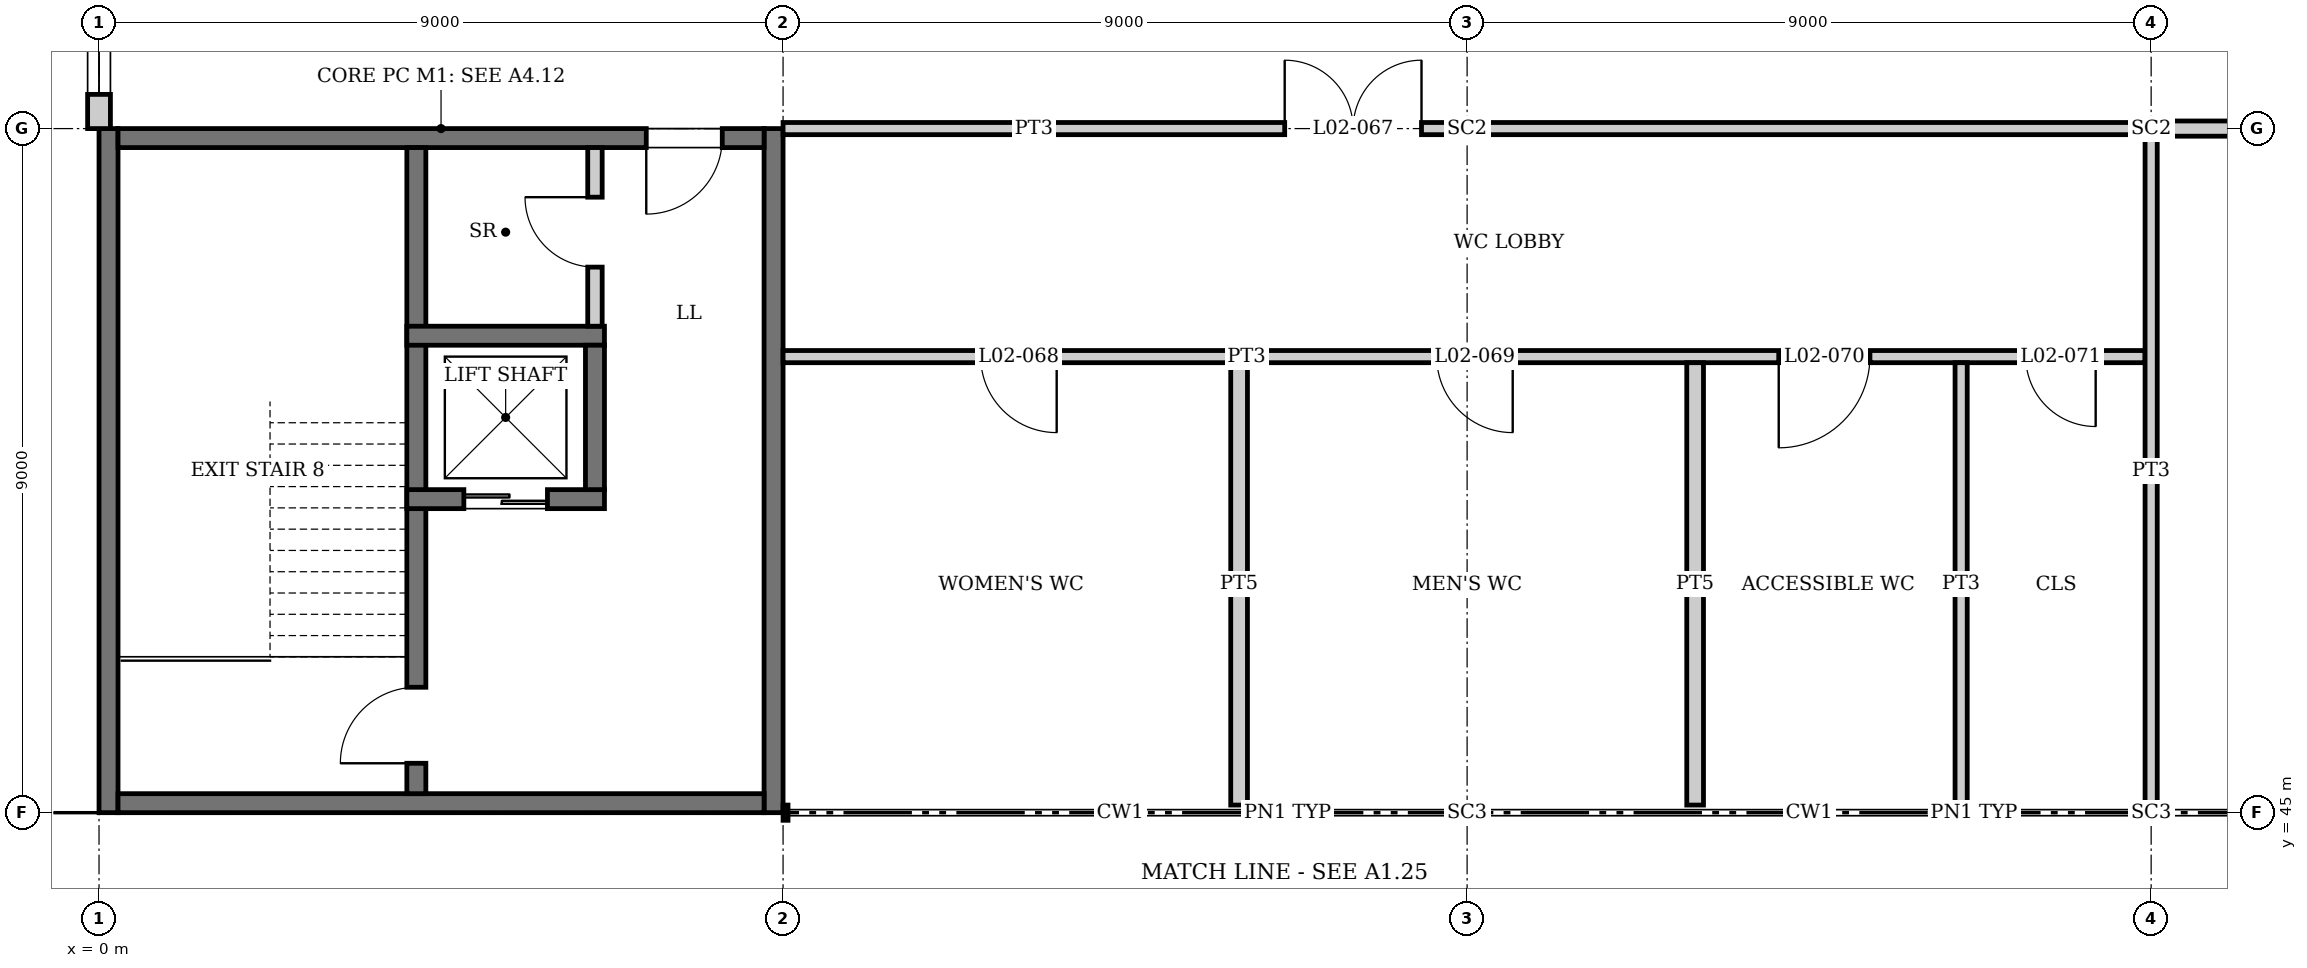
"""IFC4 building model, lengths in metres.
Left out: names, types, materials, properties, quantities, classifications, styles, units other than length and angle.
Written with IfcOpenShell. Run it as: python <this file> out.ifc"""

import sys

from ifc_helpers import new_model, si_unit, direction, frame, frame_2d, origin, origin_2d, place, context, subcontext, project, spatial, rectangle, i_section, extrude, element, fill, save


model = new_model("IFC4")
c1 = context("Model", 3, precision=1e-05, world=origin(), true_north=direction((0.0, 1.0)))
c2 = subcontext(c1, "Body", "Model", "MODEL_VIEW")
j1 = project(units=[si_unit("LENGTHUNIT", "METRE"), si_unit("PLANEANGLEUNIT", "RADIAN")], contexts=[c1])
p1 = place(None, origin())
s1 = spatial("IfcSite", under=j1, at=p1, CompositionType="ELEMENT")
p2 = place(p1, origin())
s2 = spatial("IfcBuilding", under=s1, at=p2, CompositionType="ELEMENT")
p3 = place(p2, frame((0.0, 0.0, 10.5)))
s3 = spatial("IfcBuildingStorey", under=s2, at=p3, CompositionType="ELEMENT", Elevation=10.5)
p4 = place(p3, frame((18.0, 45.0, 0.0), z_axis=(0.0, 0.0, 1.0), x_axis=(0.0, 1.0, 0.0)))
e1 = element("IfcColumn", 1, at=p4, inside=s3, PredefinedType="COLUMN", context=c2, shape_type="SweptSolid", body=[
    extrude(i_section(OverallWidth=0.254, OverallDepth=0.254, WebThickness=0.009, FlangeThickness=0.014, at=origin_2d()), origin(), (0.0, 0.0, 1.0), 4.5),
])
p5 = place(p3, frame((18.0, 54.0, 0.0), z_axis=(0.0, 0.0, 1.0), x_axis=(0.0, 1.0, 0.0)))
e2 = element("IfcColumn", 2, at=p5, inside=s3, PredefinedType="COLUMN", context=c2, shape_type="SweptSolid", body=[
    extrude(i_section(OverallWidth=0.256, OverallDepth=0.26, WebThickness=0.01, FlangeThickness=0.017, at=origin_2d()), origin(), (0.0, 0.0, 1.0), 4.5),
])
p6 = place(p3, frame((27.0, 45.0, 0.0), z_axis=(0.0, 0.0, 1.0), x_axis=(0.0, 1.0, 0.0)))
e3 = element("IfcColumn", 3, at=p6, inside=s3, PredefinedType="COLUMN", context=c2, shape_type="SweptSolid", body=[
    extrude(i_section(OverallWidth=0.254, OverallDepth=0.254, WebThickness=0.009, FlangeThickness=0.014, at=origin_2d()), origin(), (0.0, 0.0, 1.0), 4.5),
])
p7 = place(p3, frame((27.0, 54.0, 0.0), z_axis=(0.0, 0.0, 1.0), x_axis=(0.0, 1.0, 0.0)))
e4 = element("IfcColumn", 4, at=p7, inside=s3, PredefinedType="COLUMN", context=c2, shape_type="SweptSolid", body=[
    extrude(i_section(OverallWidth=0.256, OverallDepth=0.26, WebThickness=0.01, FlangeThickness=0.017, at=origin_2d()), origin(), (0.0, 0.0, 1.0), 4.5),
])
for number, where, z_axis, x_axis in (
    (5, (0.125, 45.0, 0.0), (0.0, 0.0, 1.0), (0.0, 1.0, 0.0)),
    (6, (8.875, 45.0, 0.0), (0.0, 0.0, 1.0), (0.0, 1.0, 0.0)),
):
    element("IfcWall", number, at=place(p3, frame(where, z_axis=z_axis, x_axis=x_axis)), inside=s3, PredefinedType="SHEAR", context=c2, shape_type="SweptSolid", body=[
        extrude(rectangle(XDim=9.0, YDim=0.25, at=frame_2d((4.5, 0.0))), origin(), (0.0, 0.0, 1.0), 4.35),
    ])
p8 = place(p3, frame((0.25, 45.125, 0.0), z_axis=(0.0, 0.0, 1.0), x_axis=(1.0, 0.0, 0.0)))
e7 = element("IfcWall", 7, at=p8, inside=s3, PredefinedType="SHEAR", context=c2, shape_type="SweptSolid", body=[
    extrude(rectangle(XDim=8.5, YDim=0.25, at=frame_2d((4.25, 0.0))), origin(), (0.0, 0.0, 1.0), 4.35),
])
p9 = place(p3, frame((0.25, 53.875, 0.0), z_axis=(0.0, 0.0, 1.0), x_axis=(1.0, 0.0, 0.0)))
e8 = element("IfcWall", 8, at=p9, inside=s3, PredefinedType="SHEAR", context=c2, shape_type="SweptSolid", body=[
    extrude(rectangle(XDim=8.5, YDim=0.25, at=frame_2d((4.25, 0.0))), origin(), (0.0, 0.0, 1.0), 4.35),
])
p10 = place(p9, frame((6.95, 0.0, 0.0)))
e9 = element("IfcOpeningElement", 9, at=p10, cuts=e8, PredefinedType="OPENING", context=c2, shape_type="SweptSolid", body=[
    extrude(rectangle(XDim=1.0, YDim=2.1, at=frame_2d((0.5, 1.05))), frame((0.0, 0.135, 0.0), z_axis=(0.0, -1.0, 0.0), x_axis=(1.0, 0.0, 0.0)), (0.0, 0.0, 1.0), 0.27),
])
p11 = place(p3, frame((0.0, 54.0, 0.0), z_axis=(0.0, 0.0, 1.0), x_axis=(0.0, 1.0, 0.0)))
e10 = element("IfcWall", 10, at=p11, inside=s3, PredefinedType="SOLIDWALL", context=c2, shape_type="SweptSolid", body=[
    extrude(rectangle(XDim=8.873, YDim=0.3, at=frame_2d((4.437, 0.0))), origin(), (0.0, 0.0, 1.0), 3.991),
])
p12 = place(p11, frame((0.45, 0.0, 2.4)))
e11 = element("IfcOpeningElement", 11, at=p12, cuts=e10, PredefinedType="OPENING", context=c2, shape_type="SweptSolid", body=[
    extrude(rectangle(XDim=3.6, YDim=1.0, at=frame_2d((1.8, 0.5))), frame((0.0, 0.16, 0.0), z_axis=(0.0, -1.0, 0.0), x_axis=(1.0, 0.0, 0.0)), (0.0, 0.0, 1.0), 0.32),
])
p13 = place(p11, frame((4.95, 0.0, 2.4)))
e12 = element("IfcOpeningElement", 12, at=p13, cuts=e10, PredefinedType="OPENING", context=c2, shape_type="SweptSolid", body=[
    extrude(rectangle(XDim=3.6, YDim=1.0, at=frame_2d((1.8, 0.5))), frame((0.0, 0.16, 0.0), z_axis=(0.0, -1.0, 0.0), x_axis=(1.0, 0.0, 0.0)), (0.0, 0.0, 1.0), 0.32),
])
p14 = place(p3, frame((4.175, 45.25, 0.0), z_axis=(0.0, 0.0, 1.0), x_axis=(0.0, 1.0, 0.0)))
e13 = element("IfcWall", 13, at=p14, inside=s3, PredefinedType="SOLIDWALL", context=c2, shape_type="SweptSolid", body=[
    extrude(rectangle(XDim=8.5, YDim=0.25, at=frame_2d((4.25, 0.0))), origin(), (0.0, 0.0, 1.0), 4.35),
])
p15 = place(p14, frame((0.4, 0.0, 0.0)))
e14 = element("IfcOpeningElement", 14, at=p15, cuts=e13, PredefinedType="OPENING", context=c2, shape_type="SweptSolid", body=[
    extrude(rectangle(XDim=1.0, YDim=2.1, at=frame_2d((0.5, 1.05))), frame((0.0, 0.135, 0.0), z_axis=(0.0, -1.0, 0.0), x_axis=(1.0, 0.0, 0.0)), (0.0, 0.0, 1.0), 0.27),
])
p16 = place(p3, frame((4.05, 49.125, 0.0), z_axis=(0.0, 0.0, 1.0), x_axis=(1.0, 0.0, 0.0)))
e15 = element("IfcWall", 15, at=p16, inside=s3, PredefinedType="SOLIDWALL", context=c2, shape_type="SweptSolid", body=[
    extrude(rectangle(XDim=2.6, YDim=0.25, at=frame_2d((1.3, 0.0))), origin(), (0.0, 0.0, 1.0), 4.35),
])
p17 = place(p16, frame((0.75, 0.0, 0.0)))
e16 = element("IfcOpeningElement", 16, at=p17, cuts=e15, PredefinedType="OPENING", context=c2, shape_type="SweptSolid", body=[
    extrude(rectangle(XDim=1.1, YDim=2.1, at=frame_2d((0.55, 1.05))), frame((0.0, 0.135, 0.0), z_axis=(0.0, -1.0, 0.0), x_axis=(1.0, 0.0, 0.0)), (0.0, 0.0, 1.0), 0.27),
])
p18 = place(p3, frame((4.05, 51.275, 0.0), z_axis=(0.0, 0.0, 1.0), x_axis=(1.0, 0.0, 0.0)))
e17 = element("IfcWall", 17, at=p18, inside=s3, PredefinedType="SOLIDWALL", context=c2, shape_type="SweptSolid", body=[
    extrude(rectangle(XDim=2.6, YDim=0.25, at=frame_2d((1.3, 0.0))), origin(), (0.0, 0.0, 1.0), 4.35),
])
p19 = place(p3, frame((6.525, 49.25, 0.0), z_axis=(0.0, 0.0, 1.0), x_axis=(0.0, 1.0, 0.0)))
e18 = element("IfcWall", 18, at=p19, inside=s3, PredefinedType="SOLIDWALL", context=c2, shape_type="SweptSolid", body=[
    extrude(rectangle(XDim=1.9, YDim=0.25, at=frame_2d((0.95, 0.0))), origin(), (0.0, 0.0, 1.0), 4.35),
])
p20 = place(p3, frame((9.0, 51.0, 0.0), z_axis=(0.0, 0.0, 1.0), x_axis=(1.0, 0.0, 0.0)))
e19 = element("IfcWall", 19, at=p20, inside=s3, PredefinedType="PARTITIONING", context=c2, shape_type="SweptSolid", body=[
    extrude(rectangle(XDim=17.92, YDim=0.16, at=frame_2d((8.96, 0.0))), origin(), (0.0, 0.0, 1.0), 3.998),
])
p21 = place(p20, frame((2.6, 0.0, 0.0)))
e20 = element("IfcOpeningElement", 20, at=p21, cuts=e19, PredefinedType="OPENING", context=c2, shape_type="SweptSolid", body=[
    extrude(rectangle(XDim=1.0, YDim=2.1, at=frame_2d((0.5, 1.05))), frame((0.0, 0.09, 0.0), z_axis=(0.0, -1.0, 0.0), x_axis=(1.0, 0.0, 0.0)), (0.0, 0.0, 1.0), 0.18),
])
p22 = place(p20, frame((8.6, 0.0, 0.0)))
e21 = element("IfcOpeningElement", 21, at=p22, cuts=e19, PredefinedType="OPENING", context=c2, shape_type="SweptSolid", body=[
    extrude(rectangle(XDim=1.0, YDim=2.1, at=frame_2d((0.5, 1.05))), frame((0.0, 0.09, 0.0), z_axis=(0.0, -1.0, 0.0), x_axis=(1.0, 0.0, 0.0)), (0.0, 0.0, 1.0), 0.18),
])
p23 = place(p20, frame((13.1, 0.0, 0.0)))
e22 = element("IfcOpeningElement", 22, at=p23, cuts=e19, PredefinedType="OPENING", context=c2, shape_type="SweptSolid", body=[
    extrude(rectangle(XDim=1.2, YDim=2.1, at=frame_2d((0.6, 1.05))), frame((0.0, 0.09, 0.0), z_axis=(0.0, -1.0, 0.0), x_axis=(1.0, 0.0, 0.0)), (0.0, 0.0, 1.0), 0.18),
])
p24 = place(p20, frame((16.35, 0.0, 0.0)))
e23 = element("IfcOpeningElement", 23, at=p24, cuts=e19, PredefinedType="OPENING", context=c2, shape_type="SweptSolid", body=[
    extrude(rectangle(XDim=0.92, YDim=2.1, at=frame_2d((0.46, 1.05))), frame((0.0, 0.09, 0.0), z_axis=(0.0, -1.0, 0.0), x_axis=(1.0, 0.0, 0.0)), (0.0, 0.0, 1.0), 0.18),
])
p25 = place(p3, frame((9.0, 54.0, 0.0), z_axis=(0.0, 0.0, 1.0), x_axis=(1.0, 0.0, 0.0)))
e24 = element("IfcWall", 24, at=p25, inside=s3, PredefinedType="PARTITIONING", context=c2, shape_type="SweptSolid", body=[
    extrude(rectangle(XDim=8.87, YDim=0.16, at=frame_2d((4.435, 0.0))), origin(), (0.0, 0.0, 1.0), 3.738),
])
p26 = place(p25, frame((6.6, 0.0, 0.0)))
e25 = element("IfcOpeningElement", 25, at=p26, cuts=e24, PredefinedType="OPENING", context=c2, shape_type="SweptSolid", body=[
    extrude(rectangle(XDim=1.8, YDim=2.1, at=frame_2d((0.9, 1.05))), frame((0.0, 0.09, 0.0), z_axis=(0.0, -1.0, 0.0), x_axis=(1.0, 0.0, 0.0)), (0.0, 0.0, 1.0), 0.18),
])
p27 = place(p3, frame((18.13, 54.0, 0.0), z_axis=(0.0, 0.0, 1.0), x_axis=(1.0, 0.0, 0.0)))
e26 = element("IfcWall", 26, at=p27, inside=s3, PredefinedType="PARTITIONING", context=c2, shape_type="SweptSolid", body=[
    extrude(rectangle(XDim=8.74, YDim=0.16, at=frame_2d((4.37, 0.0))), origin(), (0.0, 0.0, 1.0), 3.738),
])
p28 = place(p3, frame((27.13, 54.0, 0.0), z_axis=(0.0, 0.0, 1.0), x_axis=(1.0, 0.0, 0.0)))
e27 = element("IfcWall", 27, at=p28, inside=s3, PredefinedType="PARTITIONING", context=c2, shape_type="SweptSolid", body=[
    extrude(rectangle(XDim=8.74, YDim=0.2, at=frame_2d((4.37, 0.0))), origin(), (0.0, 0.0, 1.0), 3.738),
])
p29 = place(p28, frame((3.97, 0.0, 0.0)))
e28 = element("IfcOpeningElement", 28, at=p29, cuts=e27, PredefinedType="OPENING", context=c2, shape_type="SweptSolid", body=[
    extrude(rectangle(XDim=1.0, YDim=2.1, at=frame_2d((0.5, 1.05))), frame((0.0, 0.11, 0.0), z_axis=(0.0, -1.0, 0.0), x_axis=(1.0, 0.0, 0.0)), (0.0, 0.0, 1.0), 0.22),
])
p30 = place(p3, frame((6.525, 51.4, 0.0), z_axis=(0.0, 0.0, 1.0), x_axis=(0.0, 1.0, 0.0)))
e29 = element("IfcWall", 29, at=p30, inside=s3, PredefinedType="PARTITIONING", context=c2, shape_type="SweptSolid", body=[
    extrude(rectangle(XDim=2.35, YDim=0.19, at=frame_2d((1.175, 0.0))), origin(), (0.0, 0.0, 1.0), 4.35),
])
p31 = place(p30, frame((0.778, 0.0, 0.0)))
e30 = element("IfcOpeningElement", 30, at=p31, cuts=e29, PredefinedType="OPENING", context=c2, shape_type="SweptSolid", body=[
    extrude(rectangle(XDim=0.92, YDim=2.1, at=frame_2d((0.46, 1.05))), frame((0.0, 0.105, 0.0), z_axis=(0.0, -1.0, 0.0), x_axis=(1.0, 0.0, 0.0)), (0.0, 0.0, 1.0), 0.21),
])
for number, where, z_axis, x_axis in (
    (31, (15.0, 45.1, 0.0), (0.0, 0.0, 1.0), (0.0, 1.0, 0.0)),
    (32, (21.0, 45.1, 0.0), (0.0, 0.0, 1.0), (0.0, 1.0, 0.0)),
):
    element("IfcWall", number, at=place(p3, frame(where, z_axis=z_axis, x_axis=x_axis)), inside=s3, PredefinedType="PLUMBINGWALL", context=c2, shape_type="SweptSolid", body=[
        extrude(rectangle(XDim=5.82, YDim=0.22, at=frame_2d((2.91, 0.0))), origin(), (0.0, 0.0, 1.0), 4.35),
    ])
p32 = place(p3, frame((24.5, 45.1, 0.0), z_axis=(0.0, 0.0, 1.0), x_axis=(0.0, 1.0, 0.0)))
e33 = element("IfcWall", 33, at=p32, inside=s3, PredefinedType="PARTITIONING", context=c2, shape_type="SweptSolid", body=[
    extrude(rectangle(XDim=5.82, YDim=0.16, at=frame_2d((2.91, 0.0))), origin(), (0.0, 0.0, 1.0), 4.35),
])
p33 = place(p3, frame((27.0, 45.127, 0.0), z_axis=(0.0, 0.0, 1.0), x_axis=(0.0, 1.0, 0.0)))
e34 = element("IfcWall", 34, at=p33, inside=s3, PredefinedType="PARTITIONING", context=c2, shape_type="SweptSolid", body=[
    extrude(rectangle(XDim=8.743, YDim=0.16, at=frame_2d((4.372, 0.0))), origin(), (0.0, 0.0, 1.0), 3.998),
])
p34 = place(p12, origin())
e35 = element("IfcWindow", 35, at=p34, inside=s3, PartitioningType="SINGLE_PANEL", PredefinedType="WINDOW", context=c2, shape_type="SweptSolid", body=[
    extrude(rectangle(XDim=3.6, YDim=1.0, at=frame_2d((1.8, 0.5))), frame((0.0, 0.03, 0.0), z_axis=(0.0, -1.0, 0.0), x_axis=(1.0, 0.0, 0.0)), (0.0, 0.0, 1.0), 0.06),
])
fill(e11, e35)
p35 = place(p17, origin())
e36 = element("IfcDoor", 36, at=p35, inside=s3, OperationType="DOUBLE_DOOR_SLIDING", PredefinedType="DOOR", context=c2, shape_type="SweptSolid", body=[
    extrude(rectangle(XDim=1.1, YDim=2.1, at=frame_2d((0.55, 1.05))), frame((0.0, 0.025, 0.0), z_axis=(0.0, -1.0, 0.0), x_axis=(1.0, 0.0, 0.0)), (0.0, 0.0, 1.0), 0.05),
])
fill(e16, e36)
p36 = place(p15, origin())
e37 = element("IfcDoor", 37, at=p36, inside=s3, OperationType="SINGLE_SWING_LEFT", PredefinedType="DOOR", context=c2, shape_type="SweptSolid", body=[
    extrude(rectangle(XDim=1.0, YDim=2.1, at=frame_2d((0.5, 1.05))), frame((0.0, 0.025, 0.0), z_axis=(0.0, -1.0, 0.0), x_axis=(1.0, 0.0, 0.0)), (0.0, 0.0, 1.0), 0.05),
])
fill(e14, e37)
p37 = place(p10, frame((1.0, 0.0, 0.0), z_axis=(0.0, 0.0, 1.0), x_axis=(-1.0, 0.0, 0.0)))
e38 = element("IfcDoor", 38, at=p37, inside=s3, OperationType="SINGLE_SWING_RIGHT", PredefinedType="DOOR", context=c2, shape_type="SweptSolid", body=[
    extrude(rectangle(XDim=1.0, YDim=2.1, at=frame_2d((0.5, 1.05))), frame((0.0, 0.025, 0.0), z_axis=(0.0, -1.0, 0.0), x_axis=(1.0, 0.0, 0.0)), (0.0, 0.0, 1.0), 0.05),
])
fill(e9, e38)
p38 = place(p31, origin())
e39 = element("IfcDoor", 39, at=p38, inside=s3, OperationType="SINGLE_SWING_RIGHT", PredefinedType="DOOR", context=c2, shape_type="SweptSolid", body=[
    extrude(rectangle(XDim=0.92, YDim=2.1, at=frame_2d((0.46, 1.05))), frame((0.0, 0.025, 0.0), z_axis=(0.0, -1.0, 0.0), x_axis=(1.0, 0.0, 0.0)), (0.0, 0.0, 1.0), 0.05),
])
fill(e30, e39)
p39 = place(p26, origin())
e40 = element("IfcDoor", 40, at=p39, inside=s3, OperationType="DOUBLE_DOOR_SINGLE_SWING", PredefinedType="DOOR", context=c2, shape_type="SweptSolid", body=[
    extrude(rectangle(XDim=1.8, YDim=2.1, at=frame_2d((0.9, 1.05))), frame((0.0, 0.025, 0.0), z_axis=(0.0, -1.0, 0.0), x_axis=(1.0, 0.0, 0.0)), (0.0, 0.0, 1.0), 0.05),
])
fill(e25, e40)
p40 = place(p21, frame((1.0, 0.0, 0.0), z_axis=(0.0, 0.0, 1.0), x_axis=(-1.0, 0.0, 0.0)))
e41 = element("IfcDoor", 41, at=p40, inside=s3, OperationType="SINGLE_SWING_LEFT", PredefinedType="DOOR", context=c2, shape_type="SweptSolid", body=[
    extrude(rectangle(XDim=1.0, YDim=2.1, at=frame_2d((0.5, 1.05))), frame((0.0, 0.025, 0.0), z_axis=(0.0, -1.0, 0.0), x_axis=(1.0, 0.0, 0.0)), (0.0, 0.0, 1.0), 0.05),
])
fill(e20, e41)
p41 = place(p22, frame((1.0, 0.0, 0.0), z_axis=(0.0, 0.0, 1.0), x_axis=(-1.0, 0.0, 0.0)))
e42 = element("IfcDoor", 42, at=p41, inside=s3, OperationType="SINGLE_SWING_LEFT", PredefinedType="DOOR", context=c2, shape_type="SweptSolid", body=[
    extrude(rectangle(XDim=1.0, YDim=2.1, at=frame_2d((0.5, 1.05))), frame((0.0, 0.025, 0.0), z_axis=(0.0, -1.0, 0.0), x_axis=(1.0, 0.0, 0.0)), (0.0, 0.0, 1.0), 0.05),
])
fill(e21, e42)
p42 = place(p23, frame((1.2, 0.0, 0.0), z_axis=(0.0, 0.0, 1.0), x_axis=(-1.0, 0.0, 0.0)))
e43 = element("IfcDoor", 43, at=p42, inside=s3, OperationType="SINGLE_SWING_RIGHT", PredefinedType="DOOR", context=c2, shape_type="SweptSolid", body=[
    extrude(rectangle(XDim=1.2, YDim=2.1, at=frame_2d((0.6, 1.05))), frame((0.0, 0.025, 0.0), z_axis=(0.0, -1.0, 0.0), x_axis=(1.0, 0.0, 0.0)), (0.0, 0.0, 1.0), 0.05),
])
fill(e22, e43)
p43 = place(p24, frame((0.92, 0.0, 0.0), z_axis=(0.0, 0.0, 1.0), x_axis=(-1.0, 0.0, 0.0)))
e44 = element("IfcDoor", 44, at=p43, inside=s3, OperationType="SINGLE_SWING_LEFT", PredefinedType="DOOR", context=c2, shape_type="SweptSolid", body=[
    extrude(rectangle(XDim=0.92, YDim=2.1, at=frame_2d((0.46, 1.05))), frame((0.0, 0.025, 0.0), z_axis=(0.0, -1.0, 0.0), x_axis=(1.0, 0.0, 0.0)), (0.0, 0.0, 1.0), 0.05),
])
fill(e23, e44)
save(model, sys.argv[1])
